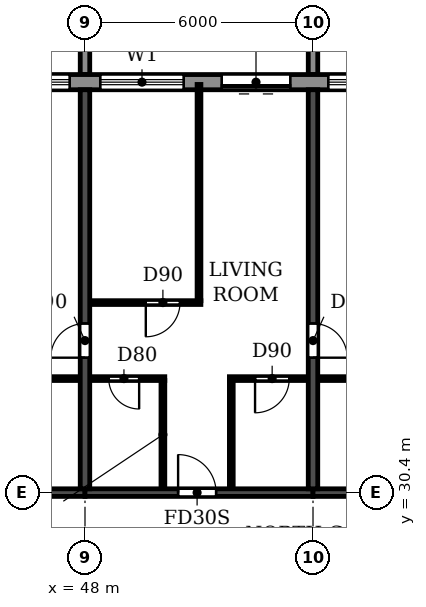
"""IFC4 building model, lengths in metres.
Left out: names, types, materials, properties, quantities, classifications, styles, units other than length and angle.
Written with IfcOpenShell. Run it as: python <this file> out.ifc"""

import sys

from ifc_helpers import new_model, si_unit, direction, frame, frame_2d, origin, place, context, subcontext, project, spatial, polyline, rectangle, outline, extrude, source, transform, mapped, element, fill, save


model = new_model("IFC4")
c1 = context("Model", 3, precision=1e-05, world=origin(), true_north=direction((0.0, 1.0)))
c2 = subcontext(c1, "Body", "Model", "MODEL_VIEW")
j1 = project(units=[si_unit("LENGTHUNIT", "METRE"), si_unit("PLANEANGLEUNIT", "RADIAN")], contexts=[c1])
p1 = place(None, origin())
s1 = spatial("IfcSite", under=j1, at=p1, CompositionType="ELEMENT")
p2 = place(p1, origin())
s2 = spatial("IfcBuilding", under=s1, at=p2, CompositionType="ELEMENT")
p3 = place(p2, frame((0.0, 0.0, 241.2)))
s3 = spatial("IfcBuildingStorey", under=s2, at=p3, CompositionType="ELEMENT", Elevation=241.2)
p4 = place(p3, frame((48.0, 30.5, 0.0), z_axis=(0.0, 0.0, 1.0), x_axis=(0.0, 1.0, 0.0)))
e1 = element("IfcWall", 1, at=p4, inside=s3, PredefinedType="SHEAR", context=c2, shape_type="SweptSolid", body=[
    extrude(rectangle(XDim=10.5, YDim=0.25, at=frame_2d((5.25, 0.0))), origin(), (0.0, 0.0, 1.0), 3.08),
])
p5 = place(p4, frame((3.45, 0.0, 0.0)))
e2 = element("IfcOpeningElement", 2, at=p5, cuts=e1, PredefinedType="OPENING", context=c2, shape_type="SweptSolid", body=[
    extrude(rectangle(XDim=0.9, YDim=2.1, at=frame_2d((0.45, 1.05))), frame((0.0, 0.135, 0.0), z_axis=(0.0, -1.0, 0.0), x_axis=(1.0, 0.0, 0.0)), (0.0, 0.0, 1.0), 0.27),
])
p6 = place(p3, frame((54.0, 30.5, 0.0), z_axis=(0.0, 0.0, 1.0), x_axis=(0.0, 1.0, 0.0)))
e3 = element("IfcWall", 3, at=p6, inside=s3, PredefinedType="SHEAR", context=c2, shape_type="SweptSolid", body=[
    extrude(rectangle(XDim=10.5, YDim=0.25, at=frame_2d((5.25, 0.0))), origin(), (0.0, 0.0, 1.0), 3.08),
])
p7 = place(p6, frame((3.45, 0.0, 0.0)))
e4 = element("IfcOpeningElement", 4, at=p7, cuts=e3, PredefinedType="OPENING", context=c2, shape_type="SweptSolid", body=[
    extrude(rectangle(XDim=0.9, YDim=2.1, at=frame_2d((0.45, 1.05))), frame((0.0, 0.135, 0.0), z_axis=(0.0, -1.0, 0.0), x_axis=(1.0, 0.0, 0.0)), (0.0, 0.0, 1.0), 0.27),
])
p8 = place(p3, frame((42.0, 30.4, 0.0), z_axis=(0.0, 0.0, 1.0), x_axis=(1.0, 0.0, 0.0)))
e5 = element("IfcWall", 5, at=p8, inside=s3, PredefinedType="SHEAR", context=c2, shape_type="SweptSolid", body=[
    extrude(rectangle(XDim=6.0, YDim=0.2, at=frame_2d((3.0, 0.0))), origin(), (0.0, 0.0, 1.0), 2.48),
])
p9 = place(p3, frame((48.0, 30.4, 0.0), z_axis=(0.0, 0.0, 1.0), x_axis=(1.0, 0.0, 0.0)))
e6 = element("IfcWall", 6, at=p9, inside=s3, PredefinedType="SHEAR", context=c2, shape_type="SweptSolid", body=[
    extrude(rectangle(XDim=6.0, YDim=0.2, at=frame_2d((3.0, 0.0))), origin(), (0.0, 0.0, 1.0), 2.48),
])
p10 = place(p9, frame((2.45, 0.0, 0.0)))
e7 = element("IfcOpeningElement", 7, at=p10, cuts=e6, PredefinedType="OPENING", context=c2, shape_type="SweptSolid", body=[
    extrude(rectangle(XDim=1.0, YDim=2.1, at=frame_2d((0.5, 1.05))), frame((0.0, 0.11, 0.0), z_axis=(0.0, -1.0, 0.0), x_axis=(1.0, 0.0, 0.0)), (0.0, 0.0, 1.0), 0.22),
])
p11 = place(p3, frame((54.0, 30.4, 0.0), z_axis=(0.0, 0.0, 1.0), x_axis=(1.0, 0.0, 0.0)))
e8 = element("IfcWall", 8, at=p11, inside=s3, PredefinedType="SHEAR", context=c2, shape_type="SweptSolid", body=[
    extrude(rectangle(XDim=6.0, YDim=0.2, at=frame_2d((3.0, 0.0))), origin(), (0.0, 0.0, 1.0), 2.48),
])
p12 = place(p3, frame((79.317, 41.2, 0.0), z_axis=(0.0, 0.0, 1.0), x_axis=(-1.0, 0.0, 0.0)))
e9 = element("IfcWall", 9, at=p12, inside=s3, PredefinedType="STANDARD", context=c2, shape_type="SweptSolid", body=[
    extrude(rectangle(XDim=56.634, YDim=0.4, at=frame_2d((28.317, 0.0))), origin(), (0.0, 0.0, 1.0), 3.08),
])
p13 = place(p12, frame((52.917, 0.0, 0.0)))
e10 = element("IfcOpeningElement", 10, at=p13, cuts=e9, PredefinedType="OPENING", context=c2, shape_type="SweptSolid", body=[
    extrude(rectangle(XDim=1.8, YDim=2.4, at=frame_2d((0.9, 1.2))), frame((0.0, 0.21, 0.0), z_axis=(0.0, -1.0, 0.0), x_axis=(1.0, 0.0, 0.0)), (0.0, 0.0, 1.0), 0.42),
])
p14 = place(p12, frame((49.717, 0.0, 0.9)))
e11 = element("IfcOpeningElement", 11, at=p14, cuts=e9, PredefinedType="OPENING", context=c2, shape_type="SweptSolid", body=[
    extrude(rectangle(XDim=2.2, YDim=1.5, at=frame_2d((1.1, 0.75))), frame((0.0, 0.21, 0.0), z_axis=(0.0, -1.0, 0.0), x_axis=(1.0, 0.0, 0.0)), (0.0, 0.0, 1.0), 0.42),
])
p15 = place(p12, frame((46.717, 0.0, 0.9)))
e12 = element("IfcOpeningElement", 12, at=p15, cuts=e9, PredefinedType="OPENING", context=c2, shape_type="SweptSolid", body=[
    extrude(rectangle(XDim=2.2, YDim=1.5, at=frame_2d((1.1, 0.75))), frame((0.0, 0.21, 0.0), z_axis=(0.0, -1.0, 0.0), x_axis=(1.0, 0.0, 0.0)), (0.0, 0.0, 1.0), 0.42),
])
p16 = place(p12, frame((43.717, 0.0, 0.9)))
e13 = element("IfcOpeningElement", 13, at=p16, cuts=e9, PredefinedType="OPENING", context=c2, shape_type="SweptSolid", body=[
    extrude(rectangle(XDim=2.2, YDim=1.5, at=frame_2d((1.1, 0.75))), frame((0.0, 0.21, 0.0), z_axis=(0.0, -1.0, 0.0), x_axis=(1.0, 0.0, 0.0)), (0.0, 0.0, 1.0), 0.42),
])
p17 = place(p12, frame((40.917, 0.0, 0.0)))
e14 = element("IfcOpeningElement", 14, at=p17, cuts=e9, PredefinedType="OPENING", context=c2, shape_type="SweptSolid", body=[
    extrude(rectangle(XDim=1.8, YDim=2.4, at=frame_2d((0.9, 1.2))), frame((0.0, 0.21, 0.0), z_axis=(0.0, -1.0, 0.0), x_axis=(1.0, 0.0, 0.0)), (0.0, 0.0, 1.0), 0.42),
])
p18 = place(p12, frame((37.717, 0.0, 0.9)))
e15 = element("IfcOpeningElement", 15, at=p18, cuts=e9, PredefinedType="OPENING", context=c2, shape_type="SweptSolid", body=[
    extrude(rectangle(XDim=2.2, YDim=1.5, at=frame_2d((1.1, 0.75))), frame((0.0, 0.21, 0.0), z_axis=(0.0, -1.0, 0.0), x_axis=(1.0, 0.0, 0.0)), (0.0, 0.0, 1.0), 0.42),
])
p19 = place(p12, frame((34.717, 0.0, 0.9)))
e16 = element("IfcOpeningElement", 16, at=p19, cuts=e9, PredefinedType="OPENING", context=c2, shape_type="SweptSolid", body=[
    extrude(rectangle(XDim=2.2, YDim=1.5, at=frame_2d((1.1, 0.75))), frame((0.0, 0.21, 0.0), z_axis=(0.0, -1.0, 0.0), x_axis=(1.0, 0.0, 0.0)), (0.0, 0.0, 1.0), 0.42),
])
p20 = place(p12, frame((31.717, 0.0, 0.9)))
e17 = element("IfcOpeningElement", 17, at=p20, cuts=e9, PredefinedType="OPENING", context=c2, shape_type="SweptSolid", body=[
    extrude(rectangle(XDim=2.2, YDim=1.5, at=frame_2d((1.1, 0.75))), frame((0.0, 0.21, 0.0), z_axis=(0.0, -1.0, 0.0), x_axis=(1.0, 0.0, 0.0)), (0.0, 0.0, 1.0), 0.42),
])
p21 = place(p12, frame((28.717, 0.0, 0.9)))
e18 = element("IfcOpeningElement", 18, at=p21, cuts=e9, PredefinedType="OPENING", context=c2, shape_type="SweptSolid", body=[
    extrude(rectangle(XDim=2.2, YDim=1.5, at=frame_2d((1.1, 0.75))), frame((0.0, 0.21, 0.0), z_axis=(0.0, -1.0, 0.0), x_axis=(1.0, 0.0, 0.0)), (0.0, 0.0, 1.0), 0.42),
])
p22 = place(p12, frame((25.917, 0.0, 0.0)))
e19 = element("IfcOpeningElement", 19, at=p22, cuts=e9, PredefinedType="OPENING", context=c2, shape_type="SweptSolid", body=[
    extrude(rectangle(XDim=1.8, YDim=2.4, at=frame_2d((0.9, 1.2))), frame((0.0, 0.21, 0.0), z_axis=(0.0, -1.0, 0.0), x_axis=(1.0, 0.0, 0.0)), (0.0, 0.0, 1.0), 0.42),
])
p23 = place(p12, frame((22.717, 0.0, 0.9)))
e20 = element("IfcOpeningElement", 20, at=p23, cuts=e9, PredefinedType="OPENING", context=c2, shape_type="SweptSolid", body=[
    extrude(rectangle(XDim=2.2, YDim=1.5, at=frame_2d((1.1, 0.75))), frame((0.0, 0.21, 0.0), z_axis=(0.0, -1.0, 0.0), x_axis=(1.0, 0.0, 0.0)), (0.0, 0.0, 1.0), 0.42),
])
p24 = place(p12, frame((19.717, 0.0, 0.9)))
e21 = element("IfcOpeningElement", 21, at=p24, cuts=e9, PredefinedType="OPENING", context=c2, shape_type="SweptSolid", body=[
    extrude(rectangle(XDim=2.2, YDim=1.5, at=frame_2d((1.1, 0.75))), frame((0.0, 0.21, 0.0), z_axis=(0.0, -1.0, 0.0), x_axis=(1.0, 0.0, 0.0)), (0.0, 0.0, 1.0), 0.42),
])
p25 = place(p12, frame((16.717, 0.0, 0.9)))
e22 = element("IfcOpeningElement", 22, at=p25, cuts=e9, PredefinedType="OPENING", context=c2, shape_type="SweptSolid", body=[
    extrude(rectangle(XDim=2.2, YDim=1.5, at=frame_2d((1.1, 0.75))), frame((0.0, 0.21, 0.0), z_axis=(0.0, -1.0, 0.0), x_axis=(1.0, 0.0, 0.0)), (0.0, 0.0, 1.0), 0.42),
])
p26 = place(p12, frame((13.917, 0.0, 0.0)))
e23 = element("IfcOpeningElement", 23, at=p26, cuts=e9, PredefinedType="OPENING", context=c2, shape_type="SweptSolid", body=[
    extrude(rectangle(XDim=1.8, YDim=2.4, at=frame_2d((0.9, 1.2))), frame((0.0, 0.21, 0.0), z_axis=(0.0, -1.0, 0.0), x_axis=(1.0, 0.0, 0.0)), (0.0, 0.0, 1.0), 0.42),
])
p27 = place(p12, frame((10.717, 0.0, 0.9)))
e24 = element("IfcOpeningElement", 24, at=p27, cuts=e9, PredefinedType="OPENING", context=c2, shape_type="SweptSolid", body=[
    extrude(rectangle(XDim=2.2, YDim=1.5, at=frame_2d((1.1, 0.75))), frame((0.0, 0.21, 0.0), z_axis=(0.0, -1.0, 0.0), x_axis=(1.0, 0.0, 0.0)), (0.0, 0.0, 1.0), 0.42),
])
p28 = place(p12, frame((7.917, 0.0, 0.0)))
e25 = element("IfcOpeningElement", 25, at=p28, cuts=e9, PredefinedType="OPENING", context=c2, shape_type="SweptSolid", body=[
    extrude(rectangle(XDim=1.8, YDim=2.4, at=frame_2d((0.9, 1.2))), frame((0.0, 0.21, 0.0), z_axis=(0.0, -1.0, 0.0), x_axis=(1.0, 0.0, 0.0)), (0.0, 0.0, 1.0), 0.42),
])
p29 = place(p12, frame((4.717, 0.0, 0.9)))
e26 = element("IfcOpeningElement", 26, at=p29, cuts=e9, PredefinedType="OPENING", context=c2, shape_type="SweptSolid", body=[
    extrude(rectangle(XDim=2.2, YDim=1.5, at=frame_2d((1.1, 0.75))), frame((0.0, 0.21, 0.0), z_axis=(0.0, -1.0, 0.0), x_axis=(1.0, 0.0, 0.0)), (0.0, 0.0, 1.0), 0.42),
])
p30 = place(p12, frame((1.917, 0.0, 0.0)))
e27 = element("IfcOpeningElement", 27, at=p30, cuts=e9, PredefinedType="OPENING", context=c2, shape_type="SweptSolid", body=[
    extrude(rectangle(XDim=1.8, YDim=2.4, at=frame_2d((0.9, 1.2))), frame((0.0, 0.21, 0.0), z_axis=(0.0, -1.0, 0.0), x_axis=(1.0, 0.0, 0.0)), (0.0, 0.0, 1.0), 0.42),
])
m1 = source(origin(), c2, "Body", "SweptSolid", [
    extrude(outline(polyline([(0.0, 0.0), (0.25, 0.0), (0.25, 3.1), (0.0, 3.1), (0.0, 0.0)])), origin(), (0.0, 0.0, 1.0), 3.1),
])
for number, where in (
    (28, (47.875, 41.4, 0.0)),
    (29, (53.875, 41.4, 0.0)),
):
    element("IfcWall", number, at=place(p3, frame(where)), inside=s3, PredefinedType="STANDARD", context=c2, shape_type="MappedRepresentation", body=[
        mapped(m1, transform((0.0, 0.0, 0.0))),
    ])
p31 = place(p3, frame((45.1, 33.4, 0.0), z_axis=(0.0, 0.0, 1.0), x_axis=(1.0, 0.0, 0.0)))
e30 = element("IfcWall", 30, at=p31, inside=s3, PredefinedType="PARTITIONING", context=c2, shape_type="SweptSolid", body=[
    extrude(rectangle(XDim=2.765, YDim=0.1, at=frame_2d((1.382, 0.0))), origin(), (0.0, 0.0, 1.0), 3.08),
])
p32 = place(p31, frame((1.0, 0.0, 0.0)))
e31 = element("IfcOpeningElement", 31, at=p32, cuts=e30, PredefinedType="OPENING", context=c2, shape_type="SweptSolid", body=[
    extrude(rectangle(XDim=0.8, YDim=2.1, at=frame_2d((0.4, 1.05))), frame((0.0, 0.06, 0.0), z_axis=(0.0, -1.0, 0.0), x_axis=(1.0, 0.0, 0.0)), (0.0, 0.0, 1.0), 0.12),
])
p33 = place(p3, frame((48.135, 33.4, 0.0), z_axis=(0.0, 0.0, 1.0), x_axis=(1.0, 0.0, 0.0)))
e32 = element("IfcWall", 32, at=p33, inside=s3, PredefinedType="PARTITIONING", context=c2, shape_type="SweptSolid", body=[
    extrude(rectangle(XDim=1.965, YDim=0.1, at=frame_2d((0.982, 0.0))), origin(), (0.0, 0.0, 1.0), 3.08),
])
p34 = place(p33, frame((0.49, 0.0, 0.0)))
e33 = element("IfcOpeningElement", 33, at=p34, cuts=e32, PredefinedType="OPENING", context=c2, shape_type="SweptSolid", body=[
    extrude(rectangle(XDim=0.8, YDim=2.1, at=frame_2d((0.4, 1.05))), frame((0.0, 0.06, 0.0), z_axis=(0.0, -1.0, 0.0), x_axis=(1.0, 0.0, 0.0)), (0.0, 0.0, 1.0), 0.12),
])
p35 = place(p3, frame((51.8, 33.4, 0.0), z_axis=(0.0, 0.0, 1.0), x_axis=(1.0, 0.0, 0.0)))
e34 = element("IfcWall", 34, at=p35, inside=s3, PredefinedType="PARTITIONING", context=c2, shape_type="SweptSolid", body=[
    extrude(rectangle(XDim=2.065, YDim=0.1, at=frame_2d((1.032, 0.0))), origin(), (0.0, 0.0, 1.0), 3.08),
])
p36 = place(p35, frame((0.675, 0.0, 0.0)))
e35 = element("IfcOpeningElement", 35, at=p36, cuts=e34, PredefinedType="OPENING", context=c2, shape_type="SweptSolid", body=[
    extrude(rectangle(XDim=0.9, YDim=2.1, at=frame_2d((0.45, 1.05))), frame((0.0, 0.06, 0.0), z_axis=(0.0, -1.0, 0.0), x_axis=(1.0, 0.0, 0.0)), (0.0, 0.0, 1.0), 0.12),
])
p37 = place(p3, frame((54.135, 33.4, 0.0), z_axis=(0.0, 0.0, 1.0), x_axis=(1.0, 0.0, 0.0)))
e36 = element("IfcWall", 36, at=p37, inside=s3, PredefinedType="PARTITIONING", context=c2, shape_type="SweptSolid", body=[
    extrude(rectangle(XDim=2.765, YDim=0.1, at=frame_2d((1.382, 0.0))), origin(), (0.0, 0.0, 1.0), 3.08),
])
p38 = place(p37, frame((0.965, 0.0, 0.0)))
e37 = element("IfcOpeningElement", 37, at=p38, cuts=e36, PredefinedType="OPENING", context=c2, shape_type="SweptSolid", body=[
    extrude(rectangle(XDim=0.8, YDim=2.1, at=frame_2d((0.4, 1.05))), frame((0.0, 0.06, 0.0), z_axis=(0.0, -1.0, 0.0), x_axis=(1.0, 0.0, 0.0)), (0.0, 0.0, 1.0), 0.12),
])
p39 = place(p3, frame((48.135, 35.4, 0.0), z_axis=(0.0, 0.0, 1.0), x_axis=(1.0, 0.0, 0.0)))
e38 = element("IfcWall", 38, at=p39, inside=s3, PredefinedType="PARTITIONING", context=c2, shape_type="SweptSolid", body=[
    extrude(rectangle(XDim=2.915, YDim=0.1, at=frame_2d((1.458, 0.0))), origin(), (0.0, 0.0, 1.0), 3.08),
])
p40 = place(p39, frame((1.465, 0.0, 0.0)))
e39 = element("IfcOpeningElement", 39, at=p40, cuts=e38, PredefinedType="OPENING", context=c2, shape_type="SweptSolid", body=[
    extrude(rectangle(XDim=0.9, YDim=2.1, at=frame_2d((0.45, 1.05))), frame((0.0, 0.06, 0.0), z_axis=(0.0, -1.0, 0.0), x_axis=(1.0, 0.0, 0.0)), (0.0, 0.0, 1.0), 0.12),
])
p41 = place(p3, frame((50.05, 30.51, 0.0), z_axis=(0.0, 0.0, 1.0), x_axis=(0.0, 1.0, 0.0)))
e40 = element("IfcWall", 40, at=p41, inside=s3, PredefinedType="PARTITIONING", context=c2, shape_type="SweptSolid", body=[
    extrude(rectangle(XDim=2.84, YDim=0.1, at=frame_2d((1.42, 0.0))), origin(), (0.0, 0.0, 1.0), 3.08),
])
p42 = place(p3, frame((51.0, 35.45, 0.0), z_axis=(0.0, 0.0, 1.0), x_axis=(0.0, 1.0, 0.0)))
e41 = element("IfcWall", 41, at=p42, inside=s3, PredefinedType="PARTITIONING", context=c2, shape_type="SweptSolid", body=[
    extrude(rectangle(XDim=5.69, YDim=0.1, at=frame_2d((2.845, 0.0))), origin(), (0.0, 0.0, 1.0), 3.08),
])
p43 = place(p3, frame((51.85, 30.51, 0.0), z_axis=(0.0, 0.0, 1.0), x_axis=(0.0, 1.0, 0.0)))
e42 = element("IfcWall", 42, at=p43, inside=s3, PredefinedType="PARTITIONING", context=c2, shape_type="SweptSolid", body=[
    extrude(rectangle(XDim=2.84, YDim=0.1, at=frame_2d((1.42, 0.0))), origin(), (0.0, 0.0, 1.0), 3.08),
])
p44 = place(p20, origin())
e43 = element("IfcWindow", 43, at=p44, inside=s3, PartitioningType="DOUBLE_PANEL_HORIZONTAL", PredefinedType="WINDOW", context=c2, shape_type="SweptSolid", body=[
    extrude(rectangle(XDim=2.2, YDim=1.5, at=frame_2d((1.1, 0.75))), frame((0.0, 0.03, 0.0), z_axis=(0.0, -1.0, 0.0), x_axis=(1.0, 0.0, 0.0)), (0.0, 0.0, 1.0), 0.06),
])
fill(e17, e43)
p45 = place(p21, origin())
e44 = element("IfcWindow", 44, at=p45, inside=s3, PartitioningType="DOUBLE_PANEL_HORIZONTAL", PredefinedType="WINDOW", context=c2, shape_type="SweptSolid", body=[
    extrude(rectangle(XDim=2.2, YDim=1.5, at=frame_2d((1.1, 0.75))), frame((0.0, 0.03, 0.0), z_axis=(0.0, -1.0, 0.0), x_axis=(1.0, 0.0, 0.0)), (0.0, 0.0, 1.0), 0.06),
])
fill(e18, e44)
p46 = place(p22, origin())
e45 = element("IfcDoor", 45, at=p46, inside=s3, OperationType="DOUBLE_DOOR_SLIDING", PredefinedType="DOOR", context=c2, shape_type="SweptSolid", body=[
    extrude(rectangle(XDim=1.8, YDim=2.4, at=frame_2d((0.9, 1.2))), frame((0.0, 0.025, 0.0), z_axis=(0.0, -1.0, 0.0), x_axis=(1.0, 0.0, 0.0)), (0.0, 0.0, 1.0), 0.05),
])
fill(e19, e45)
p47 = place(p23, origin())
e46 = element("IfcWindow", 46, at=p47, inside=s3, PartitioningType="DOUBLE_PANEL_HORIZONTAL", PredefinedType="WINDOW", context=c2, shape_type="SweptSolid", body=[
    extrude(rectangle(XDim=2.2, YDim=1.5, at=frame_2d((1.1, 0.75))), frame((0.0, 0.03, 0.0), z_axis=(0.0, -1.0, 0.0), x_axis=(1.0, 0.0, 0.0)), (0.0, 0.0, 1.0), 0.06),
])
fill(e20, e46)
p48 = place(p5, origin())
e47 = element("IfcDoor", 47, at=p48, inside=s3, OperationType="SINGLE_SWING_LEFT", PredefinedType="DOOR", context=c2, shape_type="SweptSolid", body=[
    extrude(rectangle(XDim=0.9, YDim=2.1, at=frame_2d((0.45, 1.05))), frame((0.0, 0.025, 0.0), z_axis=(0.0, -1.0, 0.0), x_axis=(1.0, 0.0, 0.0)), (0.0, 0.0, 1.0), 0.05),
])
fill(e2, e47)
p49 = place(p34, frame((0.8, 0.0, 0.0), z_axis=(0.0, 0.0, 1.0), x_axis=(-1.0, 0.0, 0.0)))
e48 = element("IfcDoor", 48, at=p49, inside=s3, OperationType="SINGLE_SWING_LEFT", PredefinedType="DOOR", context=c2, shape_type="SweptSolid", body=[
    extrude(rectangle(XDim=0.8, YDim=2.1, at=frame_2d((0.4, 1.05))), frame((0.0, 0.025, 0.0), z_axis=(0.0, -1.0, 0.0), x_axis=(1.0, 0.0, 0.0)), (0.0, 0.0, 1.0), 0.05),
])
fill(e33, e48)
p50 = place(p40, frame((0.9, 0.0, 0.0), z_axis=(0.0, 0.0, 1.0), x_axis=(-1.0, 0.0, 0.0)))
e49 = element("IfcDoor", 49, at=p50, inside=s3, OperationType="SINGLE_SWING_RIGHT", PredefinedType="DOOR", context=c2, shape_type="SweptSolid", body=[
    extrude(rectangle(XDim=0.9, YDim=2.1, at=frame_2d((0.45, 1.05))), frame((0.0, 0.025, 0.0), z_axis=(0.0, -1.0, 0.0), x_axis=(1.0, 0.0, 0.0)), (0.0, 0.0, 1.0), 0.05),
])
fill(e39, e49)
p51 = place(p10, origin())
e50 = element("IfcDoor", 50, at=p51, inside=s3, OperationType="SINGLE_SWING_LEFT", PredefinedType="DOOR", context=c2, shape_type="SweptSolid", body=[
    extrude(rectangle(XDim=1.0, YDim=2.1, at=frame_2d((0.5, 1.05))), frame((0.0, 0.025, 0.0), z_axis=(0.0, -1.0, 0.0), x_axis=(1.0, 0.0, 0.0)), (0.0, 0.0, 1.0), 0.05),
])
fill(e7, e50)
p52 = place(p36, frame((0.9, 0.0, 0.0), z_axis=(0.0, 0.0, 1.0), x_axis=(-1.0, 0.0, 0.0)))
e51 = element("IfcDoor", 51, at=p52, inside=s3, OperationType="SINGLE_SWING_RIGHT", PredefinedType="DOOR", context=c2, shape_type="SweptSolid", body=[
    extrude(rectangle(XDim=0.9, YDim=2.1, at=frame_2d((0.45, 1.05))), frame((0.0, 0.025, 0.0), z_axis=(0.0, -1.0, 0.0), x_axis=(1.0, 0.0, 0.0)), (0.0, 0.0, 1.0), 0.05),
])
fill(e35, e51)
p53 = place(p7, frame((0.9, 0.0, 0.0), z_axis=(0.0, 0.0, 1.0), x_axis=(-1.0, 0.0, 0.0)))
e52 = element("IfcDoor", 52, at=p53, inside=s3, OperationType="SINGLE_SWING_RIGHT", PredefinedType="DOOR", context=c2, shape_type="SweptSolid", body=[
    extrude(rectangle(XDim=0.9, YDim=2.1, at=frame_2d((0.45, 1.05))), frame((0.0, 0.025, 0.0), z_axis=(0.0, -1.0, 0.0), x_axis=(1.0, 0.0, 0.0)), (0.0, 0.0, 1.0), 0.05),
])
fill(e4, e52)
save(model, sys.argv[1])
